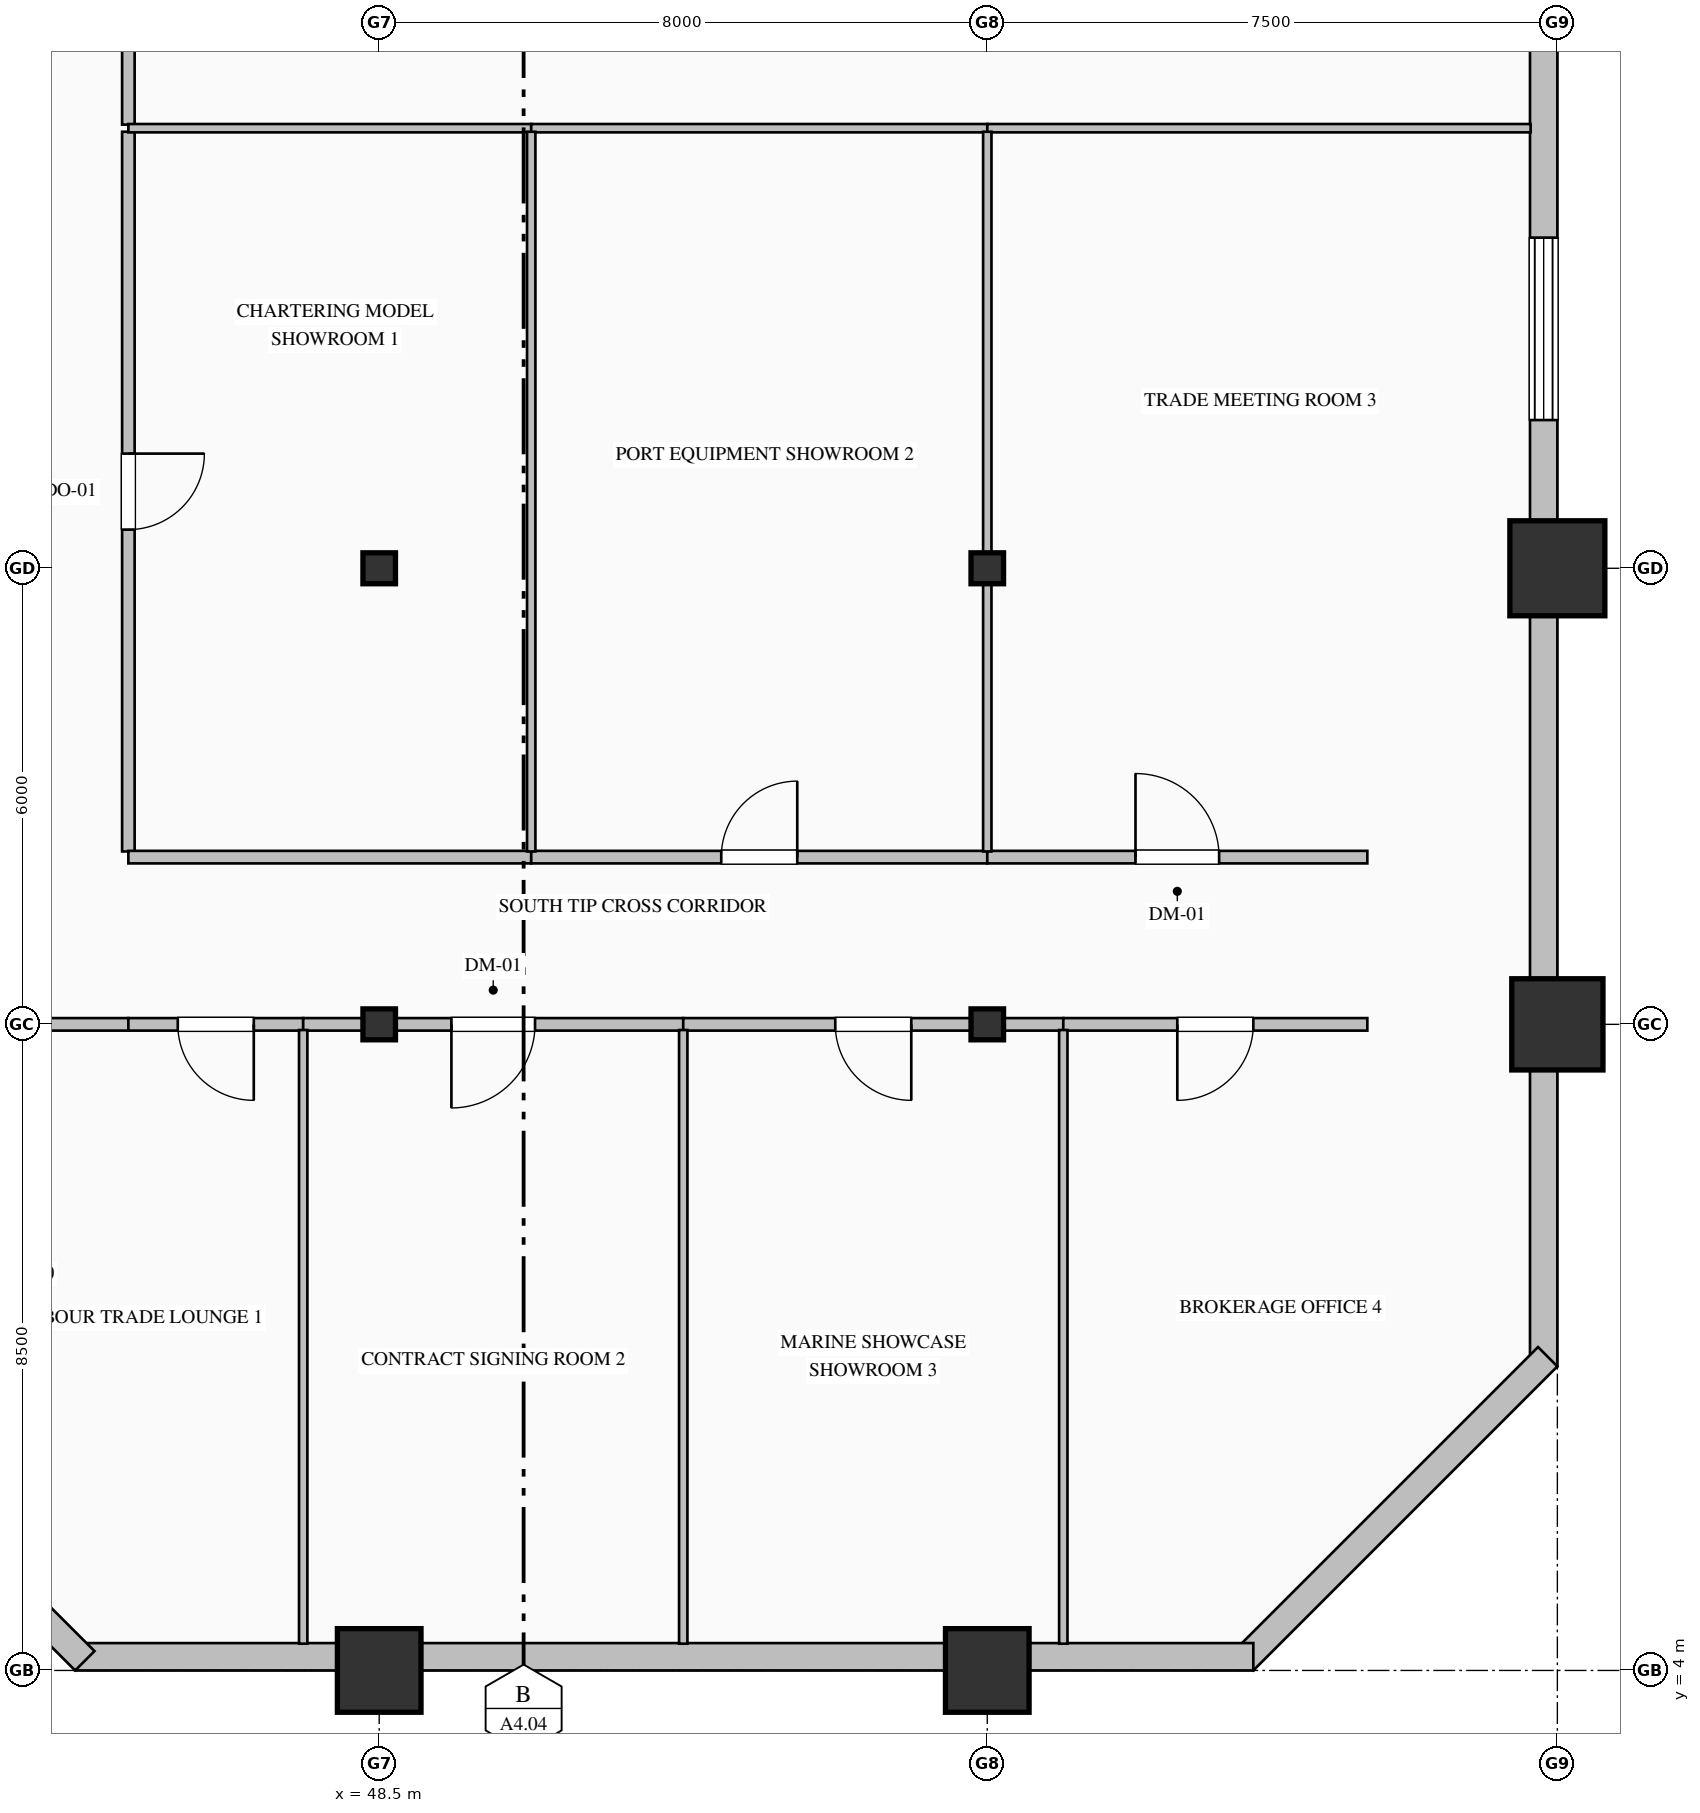
"""IFC4 building model, lengths in metres.
Left out: names, types, materials, properties, quantities, classifications, styles, units other than length and angle.
Written with IfcOpenShell. Run it as: python <this file> out.ifc"""

import sys

from ifc_helpers import new_model, si_unit, direction, frame, frame_2d, origin, origin_2d, place, context, subcontext, project, spatial, rectangle, hollow_rectangle, hollow_circle, i_section, extrude, element, fill, save


model = new_model("IFC4")
c1 = context("Model", 3, precision=1e-05, world=origin(), true_north=direction((0.0, 1.0)))
c2 = subcontext(c1, "Body", "Model", "MODEL_VIEW")
j1 = project(units=[si_unit("LENGTHUNIT", "METRE"), si_unit("PLANEANGLEUNIT", "RADIAN")], contexts=[c1])
p1 = place(None, origin())
s1 = spatial("IfcSite", under=j1, at=p1, CompositionType="ELEMENT")
p2 = place(p1, origin())
s2 = spatial("IfcBuilding", under=s1, at=p2, CompositionType="ELEMENT")
p3 = place(p2, frame((0.0, 0.0, 96.2)))
s3 = spatial("IfcBuildingStorey", under=s2, at=p3, CompositionType="ELEMENT", Elevation=96.2)
p4 = place(p3, frame((48.5, 4.0, 0.0), z_axis=(0.0, 0.0, 1.0), x_axis=(1.0, 0.0, 0.0)))
e1 = element("IfcColumn", 1, at=p4, inside=s3, PredefinedType="COLUMN", context=c2, shape_type="SweptSolid", body=[
    extrude(hollow_rectangle(XDim=1.1, YDim=1.1, WallThickness=0.04, at=origin_2d()), origin(), (0.0, 0.0, 1.0), 4.0),
])
for number, where, z_axis, x_axis in (
    (2, (48.5, 12.5, 0.0), (0.0, 0.0, 1.0), (1.0, 0.0, 0.0)),
    (3, (48.5, 18.5, 0.0), (0.0, 0.0, 1.0), (1.0, 0.0, 0.0)),
):
    element("IfcColumn", number, at=place(p3, frame(where, z_axis=z_axis, x_axis=x_axis)), inside=s3, PredefinedType="COLUMN", context=c2, shape_type="SweptSolid", body=[
        extrude(i_section(OverallWidth=0.407, OverallDepth=0.428, WebThickness=0.02, FlangeThickness=0.035, FilletRadius=0.022, at=origin_2d()), origin(), (0.0, 0.0, 1.0), 4.0),
    ])
p5 = place(p3, frame((56.5, 4.0, 0.0), z_axis=(0.0, 0.0, 1.0), x_axis=(1.0, 0.0, 0.0)))
e4 = element("IfcColumn", 4, at=p5, inside=s3, PredefinedType="COLUMN", context=c2, shape_type="SweptSolid", body=[
    extrude(hollow_rectangle(XDim=1.1, YDim=1.1, WallThickness=0.04, at=origin_2d()), origin(), (0.0, 0.0, 1.0), 4.0),
])
for number, where, z_axis, x_axis in (
    (5, (56.5, 12.5, 0.0), (0.0, 0.0, 1.0), (1.0, 0.0, 0.0)),
    (6, (56.5, 18.5, 0.0), (0.0, 0.0, 1.0), (1.0, 0.0, 0.0)),
):
    element("IfcColumn", number, at=place(p3, frame(where, z_axis=z_axis, x_axis=x_axis)), inside=s3, PredefinedType="COLUMN", context=c2, shape_type="SweptSolid", body=[
        extrude(i_section(OverallWidth=0.407, OverallDepth=0.428, WebThickness=0.02, FlangeThickness=0.035, FilletRadius=0.022, at=origin_2d()), origin(), (0.0, 0.0, 1.0), 4.0),
    ])
p6 = place(p3, frame((64.0, 12.5, 0.0), z_axis=(0.0, 0.0, 1.0), x_axis=(1.0, 0.0, 0.0)))
e7 = element("IfcColumn", 7, at=p6, inside=s3, PredefinedType="COLUMN", context=c2, shape_type="SweptSolid", body=[
    extrude(hollow_circle(Radius=0.6, WallThickness=0.04, at=origin_2d()), origin(), (0.0, 0.0, 1.0), 4.0),
])
p7 = place(p3, frame((64.0, 18.5, 0.0), z_axis=(0.0, 0.0, 1.0), x_axis=(1.0, 0.0, 0.0)))
e8 = element("IfcColumn", 8, at=p7, inside=s3, PredefinedType="COLUMN", context=c2, shape_type="SweptSolid", body=[
    extrude(hollow_rectangle(XDim=1.25, YDim=1.25, WallThickness=0.045, at=origin_2d()), origin(), (0.0, 0.0, 1.0), 4.0),
])
p8 = place(p3, frame((63.82, 36.05, 0.0), z_axis=(0.0, 0.0, 1.0), x_axis=(0.0, -1.0, 0.0)))
e9 = element("IfcWall", 9, at=p8, inside=s3, PredefinedType="SOLIDWALL", context=c2, shape_type="SweptSolid", body=[
    extrude(rectangle(XDim=28.05, YDim=0.36, at=frame_2d((14.025, 0.0))), origin(), (0.0, 0.0, 1.0), 3.25),
])
p9 = place(p8, frame((2.4, 0.0, 0.8)))
e10 = element("IfcOpeningElement", 10, at=p9, cuts=e9, PredefinedType="OPENING", context=c2, shape_type="SweptSolid", body=[
    extrude(rectangle(XDim=2.4, YDim=2.15, at=frame_2d((1.2, 1.075))), frame((0.0, 0.19, 0.0), z_axis=(0.0, -1.0, 0.0), x_axis=(1.0, 0.0, 0.0)), (0.0, 0.0, 1.0), 0.38),
])
p10 = place(p8, frame((13.2, 0.0, 0.8)))
e11 = element("IfcOpeningElement", 11, at=p10, cuts=e9, PredefinedType="OPENING", context=c2, shape_type="SweptSolid", body=[
    extrude(rectangle(XDim=2.4, YDim=2.15, at=frame_2d((1.2, 1.075))), frame((0.0, 0.19, 0.0), z_axis=(0.0, -1.0, 0.0), x_axis=(1.0, 0.0, 0.0)), (0.0, 0.0, 1.0), 0.38),
])
p11 = place(p3, frame((63.873, 8.127, 0.0), z_axis=(0.0, 0.0, 1.0), x_axis=(-0.707106781187, -0.707106781187, 0.0)))
e12 = element("IfcWall", 12, at=p11, inside=s3, PredefinedType="SOLIDWALL", context=c2, shape_type="SweptSolid", body=[
    extrude(rectangle(XDim=5.657, YDim=0.36, at=frame_2d((2.828, 0.0))), origin(), (0.0, 0.0, 1.0), 3.75),
])
p12 = place(p3, frame((60.0, 4.18, 0.0), z_axis=(0.0, 0.0, 1.0), x_axis=(-1.0, 0.0, 0.0)))
e13 = element("IfcWall", 13, at=p12, inside=s3, PredefinedType="SOLIDWALL", context=c2, shape_type="SweptSolid", body=[
    extrude(rectangle(XDim=15.5, YDim=0.36, at=frame_2d((7.75, 0.0))), origin(), (0.0, 0.0, 1.0), 3.25),
])
p13 = place(p3, frame((44.627, 4.127, 0.0), z_axis=(0.0, 0.0, 1.0), x_axis=(-0.707106781187, 0.707106781187, 0.0)))
e14 = element("IfcWall", 14, at=p13, inside=s3, PredefinedType="SOLIDWALL", context=c2, shape_type="SweptSolid", body=[
    extrude(rectangle(XDim=5.657, YDim=0.36, at=frame_2d((2.828, 0.0))), origin(), (0.0, 0.0, 1.0), 3.75),
])
p14 = place(p3, frame((45.2, 31.525, 0.0), z_axis=(0.0, 0.0, 1.0), x_axis=(0.0, -1.0, 0.0)))
e15 = element("IfcWall", 15, at=p14, inside=s3, PredefinedType="PARTITIONING", context=c2, shape_type="SweptSolid", body=[
    extrude(rectangle(XDim=7.188, YDim=0.165, at=frame_2d((3.594, 0.0))), origin(), (0.0, 0.0, 1.0), 3.75),
])
p15 = place(p3, frame((45.2, 24.243, 0.0), z_axis=(0.0, 0.0, 1.0), x_axis=(0.0, -1.0, 0.0)))
e16 = element("IfcWall", 16, at=p15, inside=s3, PredefinedType="PARTITIONING", context=c2, shape_type="SweptSolid", body=[
    extrude(rectangle(XDim=9.469, YDim=0.165, at=frame_2d((4.734, 0.0))), origin(), (0.0, 0.0, 1.0), 3.75),
])
p16 = place(p15, frame((4.234, 0.0, 0.0)))
e17 = element("IfcOpeningElement", 17, at=p16, cuts=e16, PredefinedType="OPENING", context=c2, shape_type="SweptSolid", body=[
    extrude(rectangle(XDim=1.0, YDim=2.15, at=frame_2d((0.5, 1.075))), frame((0.0, 0.093, 0.0), z_axis=(0.0, -1.0, 0.0), x_axis=(1.0, 0.0, 0.0)), (0.0, 0.0, 1.0), 0.185),
])
p17 = place(p3, frame((45.2, 12.5, 0.0), z_axis=(0.0, 0.0, 1.0), x_axis=(-1.0, 0.0, 0.0)))
e18 = element("IfcWall", 18, at=p17, inside=s3, PredefinedType="PARTITIONING", context=c2, shape_type="SweptSolid", body=[
    extrude(rectangle(XDim=2.2, YDim=0.165, at=frame_2d((1.1, 0.0))), origin(), (0.0, 0.0, 1.0), 3.042),
])
p18 = place(p3, frame((45.2, 14.7, 0.0), z_axis=(0.0, 0.0, 1.0), x_axis=(1.0, 0.0, 0.0)))
e19 = element("IfcWall", 19, at=p18, inside=s3, PredefinedType="PARTITIONING", context=c2, shape_type="SweptSolid", body=[
    extrude(rectangle(XDim=5.3, YDim=0.165, at=frame_2d((2.65, 0.0))), origin(), (0.0, 0.0, 1.0), 3.75),
])
p19 = place(p3, frame((50.5, 14.7, 0.0), z_axis=(0.0, 0.0, 1.0), x_axis=(1.0, 0.0, 0.0)))
e20 = element("IfcWall", 20, at=p19, inside=s3, PredefinedType="PARTITIONING", context=c2, shape_type="SweptSolid", body=[
    extrude(rectangle(XDim=6.0, YDim=0.165, at=frame_2d((3.0, 0.0))), origin(), (0.0, 0.0, 1.0), 3.75),
])
p20 = place(p19, frame((2.5, 0.0, 0.0)))
e21 = element("IfcOpeningElement", 21, at=p20, cuts=e20, PredefinedType="OPENING", context=c2, shape_type="SweptSolid", body=[
    extrude(rectangle(XDim=1.0, YDim=2.15, at=frame_2d((0.5, 1.075))), frame((0.0, 0.093, 0.0), z_axis=(0.0, -1.0, 0.0), x_axis=(1.0, 0.0, 0.0)), (0.0, 0.0, 1.0), 0.185),
])
p21 = place(p3, frame((56.5, 14.7, 0.0), z_axis=(0.0, 0.0, 1.0), x_axis=(1.0, 0.0, 0.0)))
e22 = element("IfcWall", 22, at=p21, inside=s3, PredefinedType="PARTITIONING", context=c2, shape_type="SweptSolid", body=[
    extrude(rectangle(XDim=5.0, YDim=0.165, at=frame_2d((2.5, 0.0))), origin(), (0.0, 0.0, 1.0), 3.75),
])
p22 = place(p21, frame((1.95, 0.0, 0.0)))
e23 = element("IfcOpeningElement", 23, at=p22, cuts=e22, PredefinedType="OPENING", context=c2, shape_type="SweptSolid", body=[
    extrude(rectangle(XDim=1.1, YDim=2.2, at=frame_2d((0.55, 1.1))), frame((0.0, 0.093, 0.0), z_axis=(0.0, -1.0, 0.0), x_axis=(1.0, 0.0, 0.0)), (0.0, 0.0, 1.0), 0.185),
])
p23 = place(p3, frame((47.5, 12.5, 0.0), z_axis=(0.0, 0.0, 1.0), x_axis=(-1.0, 0.0, 0.0)))
e24 = element("IfcWall", 24, at=p23, inside=s3, PredefinedType="PARTITIONING", context=c2, shape_type="SweptSolid", body=[
    extrude(rectangle(XDim=2.3, YDim=0.165, at=frame_2d((1.15, 0.0))), origin(), (0.0, 0.0, 1.0), 3.042),
])
p24 = place(p23, frame((0.65, 0.0, 0.0)))
e25 = element("IfcOpeningElement", 25, at=p24, cuts=e24, PredefinedType="OPENING", context=c2, shape_type="SweptSolid", body=[
    extrude(rectangle(XDim=1.0, YDim=2.15, at=frame_2d((0.5, 1.075))), frame((0.0, 0.093, 0.0), z_axis=(0.0, -1.0, 0.0), x_axis=(1.0, 0.0, 0.0)), (0.0, 0.0, 1.0), 0.185),
])
p25 = place(p3, frame((52.5, 12.5, 0.0), z_axis=(0.0, 0.0, 1.0), x_axis=(-1.0, 0.0, 0.0)))
e26 = element("IfcWall", 26, at=p25, inside=s3, PredefinedType="PARTITIONING", context=c2, shape_type="SweptSolid", body=[
    extrude(rectangle(XDim=5.0, YDim=0.165, at=frame_2d((2.5, 0.0))), origin(), (0.0, 0.0, 1.0), 3.042),
])
p26 = place(p25, frame((1.95, 0.0, 0.0)))
e27 = element("IfcOpeningElement", 27, at=p26, cuts=e26, PredefinedType="OPENING", context=c2, shape_type="SweptSolid", body=[
    extrude(rectangle(XDim=1.1, YDim=2.2, at=frame_2d((0.55, 1.1))), frame((0.0, 0.093, 0.0), z_axis=(0.0, -1.0, 0.0), x_axis=(1.0, 0.0, 0.0)), (0.0, 0.0, 1.0), 0.185),
])
p27 = place(p3, frame((57.5, 12.5, 0.0), z_axis=(0.0, 0.0, 1.0), x_axis=(-1.0, 0.0, 0.0)))
e28 = element("IfcWall", 28, at=p27, inside=s3, PredefinedType="PARTITIONING", context=c2, shape_type="SweptSolid", body=[
    extrude(rectangle(XDim=5.0, YDim=0.165, at=frame_2d((2.5, 0.0))), origin(), (0.0, 0.0, 1.0), 3.042),
])
p28 = place(p27, frame((2.0, 0.0, 0.0)))
e29 = element("IfcOpeningElement", 29, at=p28, cuts=e28, PredefinedType="OPENING", context=c2, shape_type="SweptSolid", body=[
    extrude(rectangle(XDim=1.0, YDim=2.15, at=frame_2d((0.5, 1.075))), frame((0.0, 0.093, 0.0), z_axis=(0.0, -1.0, 0.0), x_axis=(1.0, 0.0, 0.0)), (0.0, 0.0, 1.0), 0.185),
])
p29 = place(p3, frame((61.5, 12.5, 0.0), z_axis=(0.0, 0.0, 1.0), x_axis=(-1.0, 0.0, 0.0)))
e30 = element("IfcWall", 30, at=p29, inside=s3, PredefinedType="PARTITIONING", context=c2, shape_type="SweptSolid", body=[
    extrude(rectangle(XDim=4.0, YDim=0.165, at=frame_2d((2.0, 0.0))), origin(), (0.0, 0.0, 1.0), 3.042),
])
p30 = place(p29, frame((1.5, 0.0, 0.0)))
e31 = element("IfcOpeningElement", 31, at=p30, cuts=e30, PredefinedType="OPENING", context=c2, shape_type="SweptSolid", body=[
    extrude(rectangle(XDim=1.0, YDim=2.15, at=frame_2d((0.5, 1.075))), frame((0.0, 0.093, 0.0), z_axis=(0.0, -1.0, 0.0), x_axis=(1.0, 0.0, 0.0)), (0.0, 0.0, 1.0), 0.185),
])
p31 = place(p3, frame((50.5, 24.29, 0.0), z_axis=(0.0, 0.0, 1.0), x_axis=(-1.0, 0.0, 0.0)))
e32 = element("IfcWall", 32, at=p31, inside=s3, PredefinedType="MOVABLE", context=c2, shape_type="SweptSolid", body=[
    extrude(rectangle(XDim=5.3, YDim=0.11, at=frame_2d((2.65, 0.0))), origin(), (0.0, 0.0, 1.0), 3.75),
])
p32 = place(p3, frame((56.5, 24.29, 0.0), z_axis=(0.0, 0.0, 1.0), x_axis=(-1.0, 0.0, 0.0)))
e33 = element("IfcWall", 33, at=p32, inside=s3, PredefinedType="MOVABLE", context=c2, shape_type="SweptSolid", body=[
    extrude(rectangle(XDim=6.0, YDim=0.11, at=frame_2d((3.0, 0.0))), origin(), (0.0, 0.0, 1.0), 3.75),
])
p33 = place(p3, frame((63.648, 24.29, 0.0), z_axis=(0.0, 0.0, 1.0), x_axis=(-1.0, 0.0, 0.0)))
e34 = element("IfcWall", 34, at=p33, inside=s3, PredefinedType="MOVABLE", context=c2, shape_type="SweptSolid", body=[
    extrude(rectangle(XDim=7.148, YDim=0.11, at=frame_2d((3.574, 0.0))), origin(), (0.0, 0.0, 1.0), 3.75),
])
p34 = place(p3, frame((50.5, 24.243, 0.0), z_axis=(0.0, 0.0, 1.0), x_axis=(0.0, -1.0, 0.0)))
e35 = element("IfcWall", 35, at=p34, inside=s3, PredefinedType="MOVABLE", context=c2, shape_type="SweptSolid", body=[
    extrude(rectangle(XDim=9.469, YDim=0.11, at=frame_2d((4.734, 0.0))), origin(), (0.0, 0.0, 1.0), 3.75),
])
p35 = place(p3, frame((56.5, 24.243, 0.0), z_axis=(0.0, 0.0, 1.0), x_axis=(0.0, -1.0, 0.0)))
e36 = element("IfcWall", 36, at=p35, inside=s3, PredefinedType="MOVABLE", context=c2, shape_type="SweptSolid", body=[
    extrude(rectangle(XDim=9.469, YDim=0.11, at=frame_2d((4.734, 0.0))), origin(), (0.0, 0.0, 1.0), 2.942),
])
for number, where, z_axis, x_axis in (
    (37, (47.5, 12.426, 0.0), (0.0, 0.0, 1.0), (0.0, -1.0, 0.0)),
    (38, (52.5, 12.426, 0.0), (0.0, 0.0, 1.0), (0.0, -1.0, 0.0)),
    (39, (57.5, 12.426, 0.0), (0.0, 0.0, 1.0), (0.0, -1.0, 0.0)),
):
    element("IfcWall", number, at=place(p3, frame(where, z_axis=z_axis, x_axis=x_axis)), inside=s3, PredefinedType="MOVABLE", context=c2, shape_type="SweptSolid", body=[
        extrude(rectangle(XDim=8.073, YDim=0.11, at=frame_2d((4.037, 0.0))), origin(), (0.0, 0.0, 1.0), 3.75),
    ])
p36 = place(p10, origin())
e40 = element("IfcWindow", 40, at=p36, inside=s3, PartitioningType="TRIPLE_PANEL_VERTICAL", PredefinedType="WINDOW", context=c2, shape_type="SweptSolid", body=[
    extrude(rectangle(XDim=2.4, YDim=2.15, at=frame_2d((1.2, 1.075))), frame((0.0, 0.15, 0.0), z_axis=(0.0, -1.0, 0.0), x_axis=(1.0, 0.0, 0.0)), (0.0, 0.0, 1.0), 0.06),
])
fill(e11, e40)
p37 = place(p16, origin())
e41 = element("IfcDoor", 41, at=p37, inside=s3, OperationType="SINGLE_SWING_LEFT", PredefinedType="DOOR", context=c2, shape_type="SweptSolid", body=[
    extrude(rectangle(XDim=1.0, YDim=2.15, at=frame_2d((0.5, 1.075))), frame((0.0, 0.025, 0.0), z_axis=(0.0, -1.0, 0.0), x_axis=(1.0, 0.0, 0.0)), (0.0, 0.0, 1.0), 0.05),
])
fill(e17, e41)
p38 = place(p20, origin())
e42 = element("IfcDoor", 42, at=p38, inside=s3, OperationType="SINGLE_SWING_RIGHT", PredefinedType="DOOR", context=c2, shape_type="SweptSolid", body=[
    extrude(rectangle(XDim=1.0, YDim=2.15, at=frame_2d((0.5, 1.075))), frame((0.0, 0.025, 0.0), z_axis=(0.0, -1.0, 0.0), x_axis=(1.0, 0.0, 0.0)), (0.0, 0.0, 1.0), 0.05),
])
fill(e21, e42)
p39 = place(p22, origin())
e43 = element("IfcDoor", 43, at=p39, inside=s3, OperationType="SINGLE_SWING_LEFT", PredefinedType="DOOR", context=c2, shape_type="SweptSolid", body=[
    extrude(rectangle(XDim=1.1, YDim=2.2, at=frame_2d((0.55, 1.1))), frame((0.0, 0.025, 0.0), z_axis=(0.0, -1.0, 0.0), x_axis=(1.0, 0.0, 0.0)), (0.0, 0.0, 1.0), 0.05),
])
fill(e23, e43)
p40 = place(p24, origin())
e44 = element("IfcDoor", 44, at=p40, inside=s3, OperationType="SINGLE_SWING_LEFT", PredefinedType="DOOR", context=c2, shape_type="SweptSolid", body=[
    extrude(rectangle(XDim=1.0, YDim=2.15, at=frame_2d((0.5, 1.075))), frame((0.0, 0.025, 0.0), z_axis=(0.0, -1.0, 0.0), x_axis=(1.0, 0.0, 0.0)), (0.0, 0.0, 1.0), 0.05),
])
fill(e25, e44)
p41 = place(p26, origin())
e45 = element("IfcDoor", 45, at=p41, inside=s3, OperationType="SINGLE_SWING_RIGHT", PredefinedType="DOOR", context=c2, shape_type="SweptSolid", body=[
    extrude(rectangle(XDim=1.1, YDim=2.2, at=frame_2d((0.55, 1.1))), frame((0.0, 0.025, 0.0), z_axis=(0.0, -1.0, 0.0), x_axis=(1.0, 0.0, 0.0)), (0.0, 0.0, 1.0), 0.05),
])
fill(e27, e45)
p42 = place(p28, origin())
e46 = element("IfcDoor", 46, at=p42, inside=s3, OperationType="SINGLE_SWING_LEFT", PredefinedType="DOOR", context=c2, shape_type="SweptSolid", body=[
    extrude(rectangle(XDim=1.0, YDim=2.15, at=frame_2d((0.5, 1.075))), frame((0.0, 0.025, 0.0), z_axis=(0.0, -1.0, 0.0), x_axis=(1.0, 0.0, 0.0)), (0.0, 0.0, 1.0), 0.05),
])
fill(e29, e46)
p43 = place(p30, origin())
e47 = element("IfcDoor", 47, at=p43, inside=s3, OperationType="SINGLE_SWING_RIGHT", PredefinedType="DOOR", context=c2, shape_type="SweptSolid", body=[
    extrude(rectangle(XDim=1.0, YDim=2.15, at=frame_2d((0.5, 1.075))), frame((0.0, 0.025, 0.0), z_axis=(0.0, -1.0, 0.0), x_axis=(1.0, 0.0, 0.0)), (0.0, 0.0, 1.0), 0.05),
])
fill(e31, e47)
save(model, sys.argv[1])
